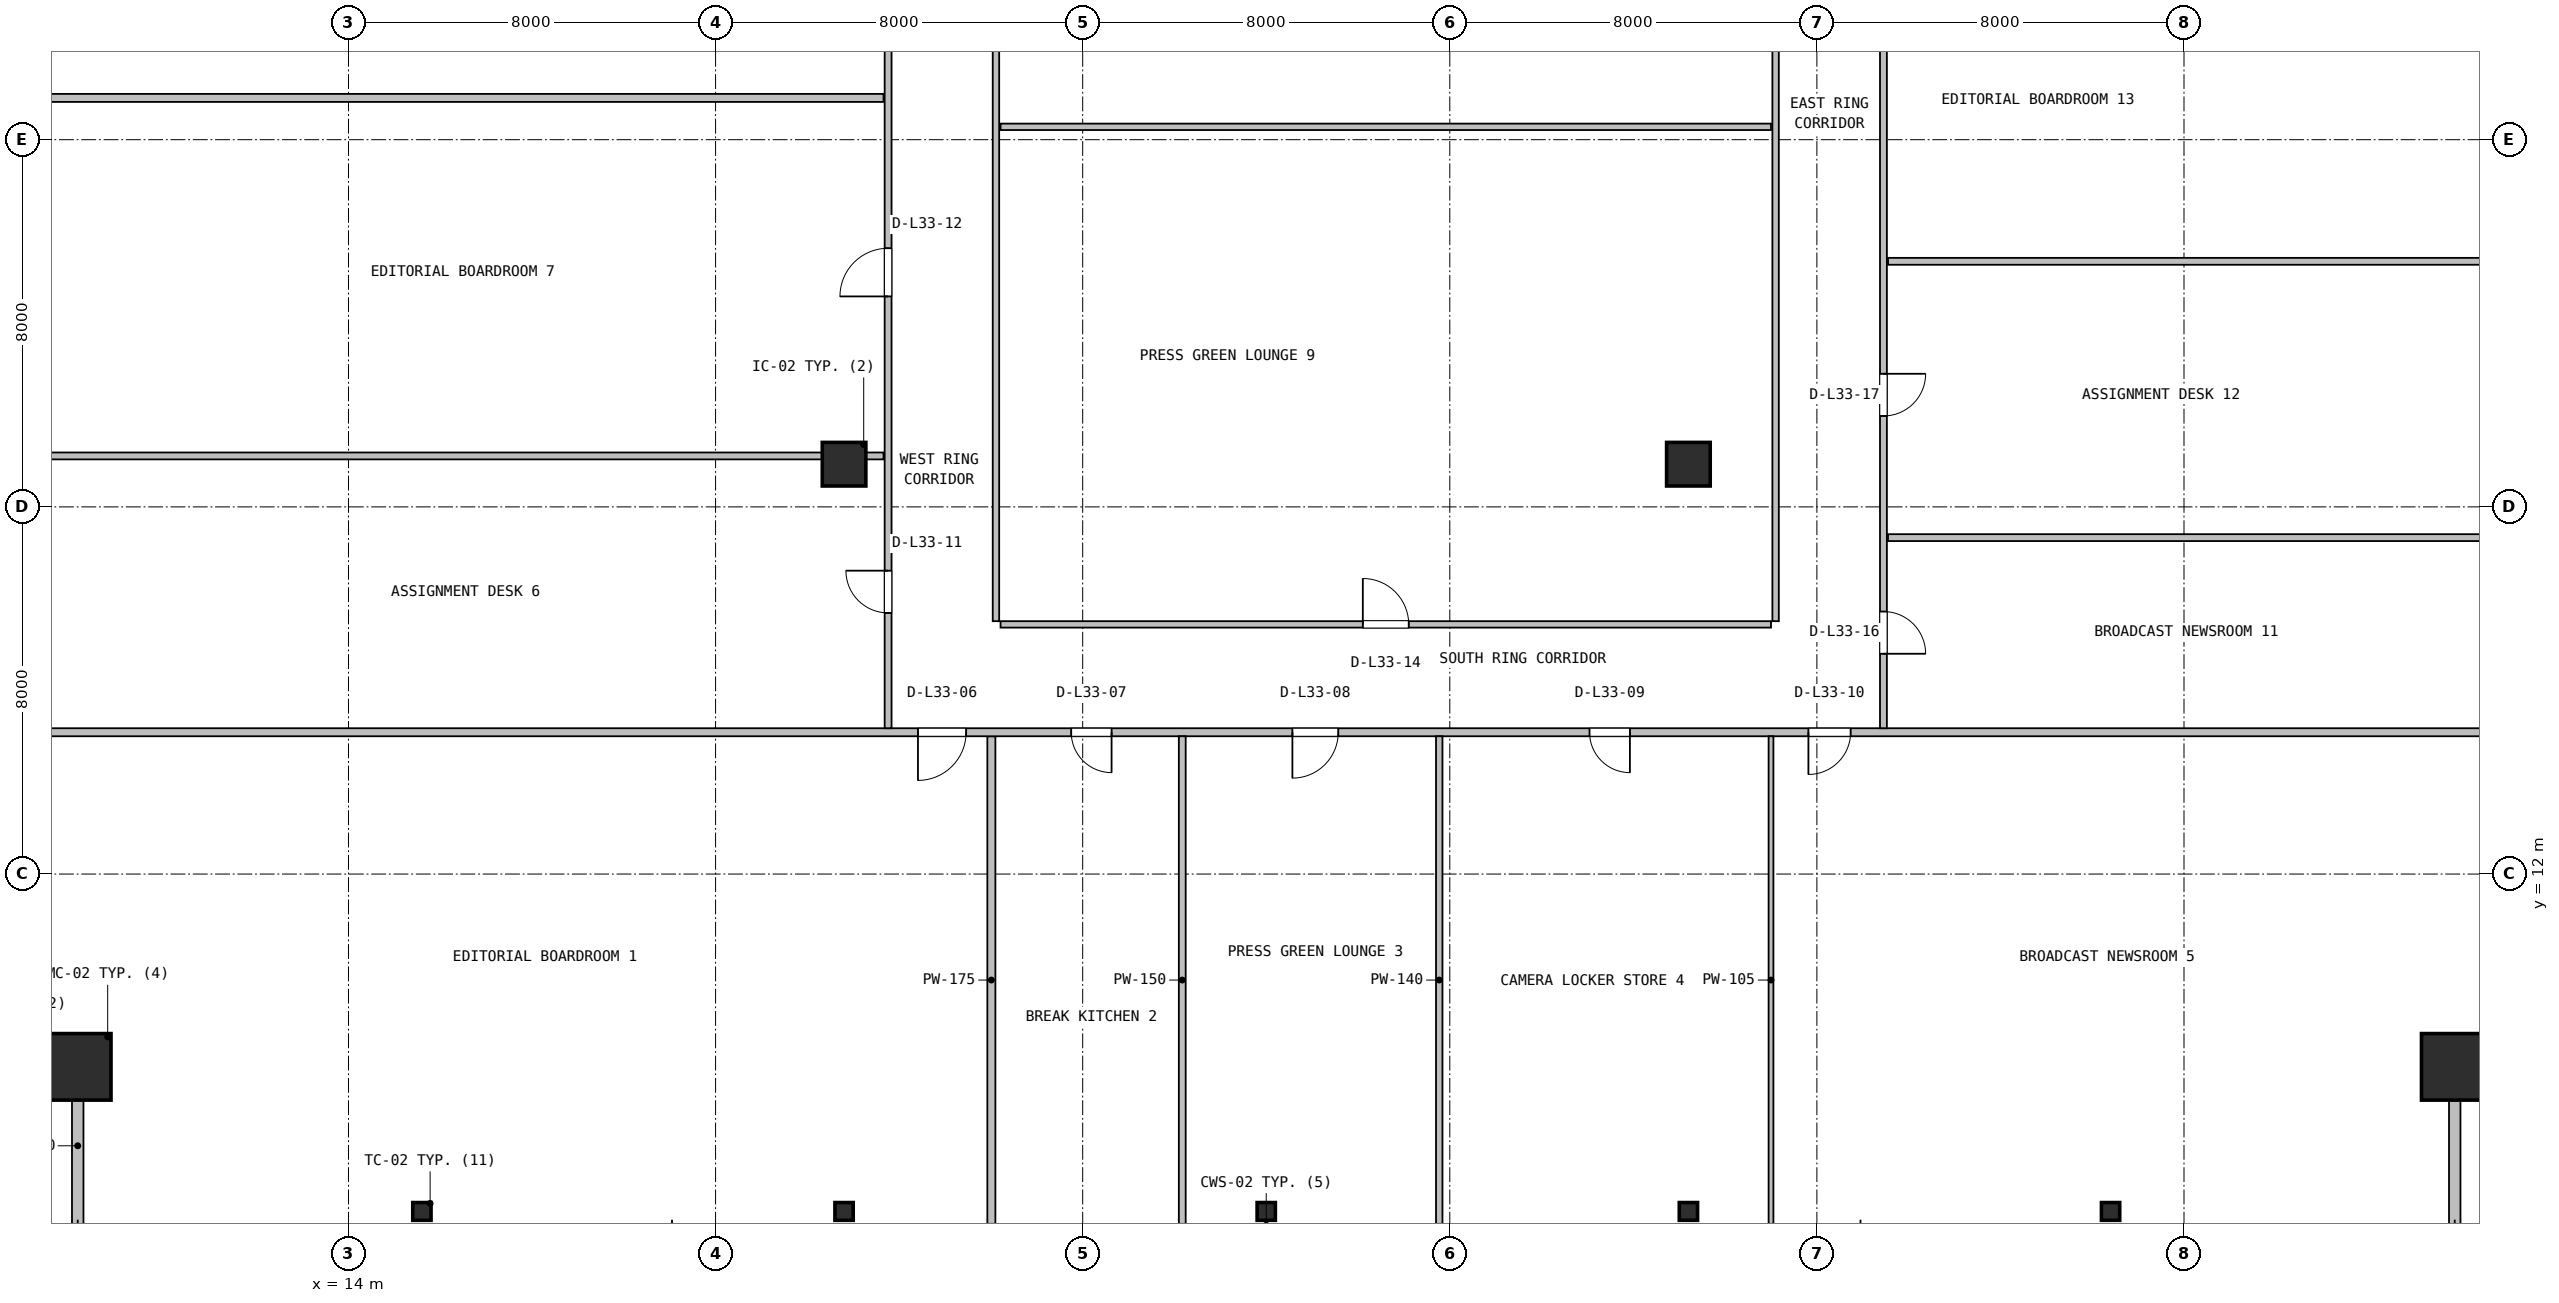
"""IFC4 building model, lengths in metres.
Left out: names, types, materials, properties, quantities, classifications, styles, units other than length and angle.
Written with IfcOpenShell. Run it as: python <this file> out.ifc"""

import sys

from ifc_helpers import new_model, si_unit, direction, frame, frame_2d, origin, origin_2d, place, context, subcontext, project, spatial, rectangle, hollow_rectangle, i_section, extrude, source, transform, mapped, element, fill, save


model = new_model("IFC4")
c1 = context("Model", 3, precision=1e-05, world=origin(), true_north=direction((0.0, 1.0)))
c2 = subcontext(c1, "Body", "Model", "MODEL_VIEW")
j1 = project(units=[si_unit("LENGTHUNIT", "METRE"), si_unit("PLANEANGLEUNIT", "RADIAN")], contexts=[c1])
p1 = place(None, origin())
s1 = spatial("IfcSite", under=j1, at=p1, CompositionType="ELEMENT")
p2 = place(p1, origin())
s2 = spatial("IfcBuilding", under=s1, at=p2, CompositionType="ELEMENT")
p3 = place(p2, frame((0.0, 0.0, 137.2)))
s3 = spatial("IfcBuildingStorey", under=s2, at=p3, CompositionType="ELEMENT", Elevation=137.2)
m1 = source(origin(), c2, "Body", "SweptSolid", [
    extrude(hollow_rectangle(XDim=1.45, YDim=1.45, WallThickness=0.055, at=origin_2d()), origin(), (0.0, 0.0, 1.0), 3.8),
])
for number, where, z_axis, x_axis in (
    (1, (8.1, 7.8, 0.0), (0.0, 0.0, 1.0), (1.0, 0.0, 0.0)),
    (2, (59.9, 7.8, 0.0), (0.0, 0.0, 1.0), (1.0, 0.0, 0.0)),
):
    element("IfcColumn", number, at=place(p3, frame(where, z_axis=z_axis, x_axis=x_axis)), inside=s3, PredefinedType="COLUMN", context=c2, shape_type="MappedRepresentation", body=[
        mapped(m1, transform((0.0, 0.0, 0.0), x_axis=(1.0, 0.0, 0.0), y_axis=(0.0, 1.0, 0.0), z_axis=(0.0, 0.0, 1.0), scale=1.0)),
    ])
m2 = source(origin(), c2, "Body", "SweptSolid", [
    extrude(i_section(OverallWidth=0.398, OverallDepth=0.387, WebThickness=0.021, FlangeThickness=0.033, FilletRadius=0.018, at=origin_2d()), origin(), (0.0, 0.0, 1.0), 3.8),
])
for number, where, z_axis, x_axis in (
    (3, (15.6, 4.65, 0.0), (0.0, 0.0, 1.0), (1.0, 0.0, 0.0)),
    (4, (24.8, 4.65, 0.0), (0.0, 0.0, 1.0), (1.0, 0.0, 0.0)),
    (5, (34.0, 4.65, 0.0), (0.0, 0.0, 1.0), (1.0, 0.0, 0.0)),
    (6, (43.2, 4.65, 0.0), (0.0, 0.0, 1.0), (1.0, 0.0, 0.0)),
    (7, (52.4, 4.65, 0.0), (0.0, 0.0, 1.0), (1.0, 0.0, 0.0)),
):
    element("IfcColumn", number, at=place(p3, frame(where, z_axis=z_axis, x_axis=x_axis)), inside=s3, PredefinedType="COLUMN", context=c2, shape_type="MappedRepresentation", body=[
        mapped(m2, transform((0.0, 0.0, 0.0), x_axis=(1.0, 0.0, 0.0), y_axis=(0.0, 1.0, 0.0), z_axis=(0.0, 0.0, 1.0), scale=1.0)),
    ])
m3 = source(origin(), c2, "Body", "SweptSolid", [
    extrude(rectangle(XDim=0.95, YDim=0.95, at=origin_2d()), origin(), (0.0, 0.0, 1.0), 3.8),
])
for number, where, z_axis, x_axis in (
    (8, (24.8, 20.93, 0.0), (0.0, 0.0, 1.0), (1.0, 0.0, 0.0)),
    (9, (43.2, 20.93, 0.0), (0.0, 0.0, 1.0), (1.0, 0.0, 0.0)),
):
    element("IfcColumn", number, at=place(p3, frame(where, z_axis=z_axis, x_axis=x_axis)), inside=s3, PredefinedType="COLUMN", context=c2, shape_type="MappedRepresentation", body=[
        mapped(m3, transform((0.0, 0.0, 0.0), x_axis=(1.0, 0.0, 0.0), y_axis=(0.0, 1.0, 0.0), z_axis=(0.0, 0.0, 1.0), scale=1.0)),
    ])
for number, where, z_axis, x_axis in (
    (10, (8.1, 4.28, 0.0), (0.0, 0.0, 1.0), (0.0, 1.0, 0.0)),
    (11, (59.9, 4.28, 0.0), (0.0, 0.0, 1.0), (0.0, 1.0, 0.0)),
):
    element("IfcWall", number, at=place(p3, frame(where, z_axis=z_axis, x_axis=x_axis)), inside=s3, PredefinedType="SOLIDWALL", context=c2, shape_type="SweptSolid", body=[
        extrude(rectangle(XDim=3.6, YDim=0.25, at=frame_2d((1.8, 0.0))), origin(), (0.0, 0.0, 1.0), 3.038),
    ])
p4 = place(p3, frame((28.01, 4.38, 0.0), z_axis=(0.0, 0.0, 1.0), x_axis=(0.0, 1.0, 0.0)))
e12 = element("IfcWall", 12, at=p4, inside=s3, PredefinedType="PARTITIONING", context=c2, shape_type="SweptSolid", body=[
    extrude(rectangle(XDim=10.622, YDim=0.175, at=frame_2d((5.311, 0.0))), origin(), (0.0, 0.0, 1.0), 3.038),
])
p5 = place(p3, frame((4.68, 15.09, 0.0), z_axis=(0.0, 0.0, 1.0), x_axis=(1.0, 0.0, 0.0)))
e13 = element("IfcWall", 13, at=p5, inside=s3, PredefinedType="PARTITIONING", context=c2, shape_type="SweptSolid", body=[
    extrude(rectangle(XDim=58.64, YDim=0.175, at=frame_2d((29.32, 0.0))), origin(), (0.0, 0.0, 1.0), 2.76),
])
p6 = place(p5, frame((21.73, 0.0, 0.0)))
e14 = element("IfcOpeningElement", 14, at=p6, cuts=e13, PredefinedType="OPENING", context=c2, shape_type="SweptSolid", body=[
    extrude(rectangle(XDim=1.05, YDim=2.1, at=frame_2d((0.525, 1.05))), frame((0.0, 0.098, 0.0), z_axis=(0.0, -1.0, 0.0), x_axis=(1.0, 0.0, 0.0)), (0.0, 0.0, 1.0), 0.195),
])
p7 = place(p5, frame((25.07, 0.0, 0.0)))
e15 = element("IfcOpeningElement", 15, at=p7, cuts=e13, PredefinedType="OPENING", context=c2, shape_type="SweptSolid", body=[
    extrude(rectangle(XDim=0.88, YDim=2.06, at=frame_2d((0.44, 1.03))), frame((0.0, 0.098, 0.0), z_axis=(0.0, -1.0, 0.0), x_axis=(1.0, 0.0, 0.0)), (0.0, 0.0, 1.0), 0.195),
])
p8 = place(p5, frame((29.89, 0.0, 0.0)))
e16 = element("IfcOpeningElement", 16, at=p8, cuts=e13, PredefinedType="OPENING", context=c2, shape_type="SweptSolid", body=[
    extrude(rectangle(XDim=1.0, YDim=2.1, at=frame_2d((0.5, 1.05))), frame((0.0, 0.098, 0.0), z_axis=(0.0, -1.0, 0.0), x_axis=(1.0, 0.0, 0.0)), (0.0, 0.0, 1.0), 0.195),
])
p9 = place(p5, frame((36.365, 0.0, 0.0)))
e17 = element("IfcOpeningElement", 17, at=p9, cuts=e13, PredefinedType="OPENING", context=c2, shape_type="SweptSolid", body=[
    extrude(rectangle(XDim=0.88, YDim=2.06, at=frame_2d((0.44, 1.03))), frame((0.0, 0.098, 0.0), z_axis=(0.0, -1.0, 0.0), x_axis=(1.0, 0.0, 0.0)), (0.0, 0.0, 1.0), 0.195),
])
p10 = place(p5, frame((41.135, 0.0, 0.0)))
e18 = element("IfcOpeningElement", 18, at=p10, cuts=e13, PredefinedType="OPENING", context=c2, shape_type="SweptSolid", body=[
    extrude(rectangle(XDim=0.92, YDim=2.08, at=frame_2d((0.46, 1.04))), frame((0.0, 0.098, 0.0), z_axis=(0.0, -1.0, 0.0), x_axis=(1.0, 0.0, 0.0)), (0.0, 0.0, 1.0), 0.195),
])
p11 = place(p3, frame((32.17, 4.38, 0.0), z_axis=(0.0, 0.0, 1.0), x_axis=(0.0, 1.0, 0.0)))
e19 = element("IfcWall", 19, at=p11, inside=s3, PredefinedType="PARTITIONING", context=c2, shape_type="SweptSolid", body=[
    extrude(rectangle(XDim=10.622, YDim=0.15, at=frame_2d((5.311, 0.0))), origin(), (0.0, 0.0, 1.0), 3.038),
])
p12 = place(p3, frame((37.77, 4.38, 0.0), z_axis=(0.0, 0.0, 1.0), x_axis=(0.0, 1.0, 0.0)))
e20 = element("IfcWall", 20, at=p12, inside=s3, PredefinedType="PARTITIONING", context=c2, shape_type="SweptSolid", body=[
    extrude(rectangle(XDim=10.622, YDim=0.14, at=frame_2d((5.311, 0.0))), origin(), (0.0, 0.0, 1.0), 3.038),
])
p13 = place(p3, frame((45.0, 4.38, 0.0), z_axis=(0.0, 0.0, 1.0), x_axis=(0.0, 1.0, 0.0)))
e21 = element("IfcWall", 21, at=p13, inside=s3, PredefinedType="PARTITIONING", context=c2, shape_type="SweptSolid", body=[
    extrude(rectangle(XDim=10.622, YDim=0.105, at=frame_2d((5.311, 0.0))), origin(), (0.0, 0.0, 1.0), 3.038),
])
p14 = place(p3, frame((25.76, 15.178, 0.0), z_axis=(0.0, 0.0, 1.0), x_axis=(0.0, 1.0, 0.0)))
e22 = element("IfcWall", 22, at=p14, inside=s3, PredefinedType="PARTITIONING", context=c2, shape_type="SweptSolid", body=[
    extrude(rectangle(XDim=18.097, YDim=0.15, at=frame_2d((9.048, 0.0))), origin(), (0.0, 0.0, 1.0), 2.76),
])
p15 = place(p14, frame((2.512, 0.0, 0.0)))
e23 = element("IfcOpeningElement", 23, at=p15, cuts=e22, PredefinedType="OPENING", context=c2, shape_type="SweptSolid", body=[
    extrude(rectangle(XDim=0.92, YDim=2.08, at=frame_2d((0.46, 1.04))), frame((0.0, 0.085, 0.0), z_axis=(0.0, -1.0, 0.0), x_axis=(1.0, 0.0, 0.0)), (0.0, 0.0, 1.0), 0.17),
])
p16 = place(p14, frame((9.407, 0.0, 0.0)))
e24 = element("IfcOpeningElement", 24, at=p16, cuts=e22, PredefinedType="OPENING", context=c2, shape_type="SweptSolid", body=[
    extrude(rectangle(XDim=1.05, YDim=2.1, at=frame_2d((0.525, 1.05))), frame((0.0, 0.085, 0.0), z_axis=(0.0, -1.0, 0.0), x_axis=(1.0, 0.0, 0.0)), (0.0, 0.0, 1.0), 0.17),
])
p17 = place(p3, frame((4.68, 21.11, 0.0), z_axis=(0.0, 0.0, 1.0), x_axis=(1.0, 0.0, 0.0)))
e25 = element("IfcWall", 25, at=p17, inside=s3, PredefinedType="PARTITIONING", context=c2, shape_type="SweptSolid", body=[
    extrude(rectangle(XDim=20.98, YDim=0.15, at=frame_2d((10.49, 0.0))), origin(), (0.0, 0.0, 1.0), 2.76),
])
p18 = place(p3, frame((4.68, 28.91, 0.0), z_axis=(0.0, 0.0, 1.0), x_axis=(1.0, 0.0, 0.0)))
e26 = element("IfcWall", 26, at=p18, inside=s3, PredefinedType="PARTITIONING", context=c2, shape_type="SweptSolid", body=[
    extrude(rectangle(XDim=20.98, YDim=0.175, at=frame_2d((10.49, 0.0))), origin(), (0.0, 0.0, 1.0), 2.76),
])
p19 = place(p3, frame((28.21, 17.44, 0.0), z_axis=(0.0, 0.0, 1.0), x_axis=(1.0, 0.0, 0.0)))
e27 = element("IfcWall", 27, at=p19, inside=s3, PredefinedType="PARTITIONING", context=c2, shape_type="SweptSolid", body=[
    extrude(rectangle(XDim=16.79, YDim=0.14, at=frame_2d((8.395, 0.0))), origin(), (0.0, 0.0, 1.0), 2.76),
])
p20 = place(p19, frame((7.895, 0.0, 0.0)))
e28 = element("IfcOpeningElement", 28, at=p20, cuts=e27, PredefinedType="OPENING", context=c2, shape_type="SweptSolid", body=[
    extrude(rectangle(XDim=1.0, YDim=2.1, at=frame_2d((0.5, 1.05))), frame((0.0, 0.08, 0.0), z_axis=(0.0, -1.0, 0.0), x_axis=(1.0, 0.0, 0.0)), (0.0, 0.0, 1.0), 0.16),
])
p21 = place(p3, frame((45.1, 17.51, 0.0), z_axis=(0.0, 0.0, 1.0), x_axis=(0.0, 1.0, 0.0)))
e29 = element("IfcWall", 29, at=p21, inside=s3, PredefinedType="PARTITIONING", context=c2, shape_type="SweptSolid", body=[
    extrude(rectangle(XDim=15.787, YDim=0.14, at=frame_2d((7.894, 0.0))), origin(), (0.0, 0.0, 1.0), 3.152),
])
p22 = place(p3, frame((28.21, 28.28, 0.0), z_axis=(0.0, 0.0, 1.0), x_axis=(1.0, 0.0, 0.0)))
e30 = element("IfcWall", 30, at=p22, inside=s3, PredefinedType="PARTITIONING", context=c2, shape_type="SweptSolid", body=[
    extrude(rectangle(XDim=16.79, YDim=0.14, at=frame_2d((8.395, 0.0))), origin(), (0.0, 0.0, 1.0), 2.76),
])
p23 = place(p3, frame((28.11, 17.51, 0.0), z_axis=(0.0, 0.0, 1.0), x_axis=(0.0, 1.0, 0.0)))
e31 = element("IfcWall", 31, at=p23, inside=s3, PredefinedType="PARTITIONING", context=c2, shape_type="SweptSolid", body=[
    extrude(rectangle(XDim=15.787, YDim=0.14, at=frame_2d((7.894, 0.0))), origin(), (0.0, 0.0, 1.0), 2.76),
])
p24 = place(p3, frame((47.55, 19.33, 0.0), z_axis=(0.0, 0.0, 1.0), x_axis=(1.0, 0.0, 0.0)))
e32 = element("IfcWall", 32, at=p24, inside=s3, PredefinedType="PARTITIONING", context=c2, shape_type="SweptSolid", body=[
    extrude(rectangle(XDim=15.77, YDim=0.15, at=frame_2d((7.885, 0.0))), origin(), (0.0, 0.0, 1.0), 3.038),
])
p25 = place(p3, frame((47.45, 15.178, 0.0), z_axis=(0.0, 0.0, 1.0), x_axis=(0.0, 1.0, 0.0)))
e33 = element("IfcWall", 33, at=p25, inside=s3, PredefinedType="PARTITIONING", context=c2, shape_type="SweptSolid", body=[
    extrude(rectangle(XDim=18.085, YDim=0.15, at=frame_2d((9.042, 0.0))), origin(), (0.0, 0.0, 1.0), 3.152),
])
p26 = place(p25, frame((1.622, 0.0, 0.0)))
e34 = element("IfcOpeningElement", 34, at=p26, cuts=e33, PredefinedType="OPENING", context=c2, shape_type="SweptSolid", body=[
    extrude(rectangle(XDim=0.92, YDim=2.08, at=frame_2d((0.46, 1.04))), frame((0.0, 0.085, 0.0), z_axis=(0.0, -1.0, 0.0), x_axis=(1.0, 0.0, 0.0)), (0.0, 0.0, 1.0), 0.17),
])
p27 = place(p25, frame((6.802, 0.0, 0.0)))
e35 = element("IfcOpeningElement", 35, at=p27, cuts=e33, PredefinedType="OPENING", context=c2, shape_type="SweptSolid", body=[
    extrude(rectangle(XDim=0.92, YDim=2.08, at=frame_2d((0.46, 1.04))), frame((0.0, 0.085, 0.0), z_axis=(0.0, -1.0, 0.0), x_axis=(1.0, 0.0, 0.0)), (0.0, 0.0, 1.0), 0.17),
])
p28 = place(p3, frame((47.55, 25.35, 0.0), z_axis=(0.0, 0.0, 1.0), x_axis=(1.0, 0.0, 0.0)))
e36 = element("IfcWall", 36, at=p28, inside=s3, PredefinedType="PARTITIONING", context=c2, shape_type="SweptSolid", body=[
    extrude(rectangle(XDim=15.77, YDim=0.15, at=frame_2d((7.885, 0.0))), origin(), (0.0, 0.0, 1.0), 3.038),
])
m4 = source(origin(), c2, "Body", "SweptSolid", [
    extrude(rectangle(XDim=1.05, YDim=2.1, at=frame_2d((0.525, 1.05))), frame((0.0, 0.025, 0.0), z_axis=(0.0, -1.0, 0.0), x_axis=(1.0, 0.0, 0.0)), (0.0, 0.0, 1.0), 0.05),
])
p29 = place(p6, frame((1.05, 0.0, 0.0), z_axis=(0.0, 0.0, 1.0), x_axis=(-1.0, 0.0, 0.0)))
e37 = element("IfcDoor", 37, at=p29, inside=s3, OperationType="SINGLE_SWING_LEFT", PredefinedType="DOOR", context=c2, shape_type="MappedRepresentation", body=[
    mapped(m4, transform((0.0, 0.0, 0.0), x_axis=(1.0, 0.0, 0.0), y_axis=(0.0, 1.0, 0.0), z_axis=(0.0, 0.0, 1.0), scale=1.0)),
])
fill(e14, e37)
m5 = source(origin(), c2, "Body", "SweptSolid", [
    extrude(rectangle(XDim=0.88, YDim=2.06, at=frame_2d((0.44, 1.03))), frame((0.0, 0.025, 0.0), z_axis=(0.0, -1.0, 0.0), x_axis=(1.0, 0.0, 0.0)), (0.0, 0.0, 1.0), 0.05),
])
p30 = place(p7, frame((0.88, 0.0, 0.0), z_axis=(0.0, 0.0, 1.0), x_axis=(-1.0, 0.0, 0.0)))
e38 = element("IfcDoor", 38, at=p30, inside=s3, OperationType="SINGLE_SWING_RIGHT", PredefinedType="DOOR", context=c2, shape_type="MappedRepresentation", body=[
    mapped(m5, transform((0.0, 0.0, 0.0), x_axis=(1.0, 0.0, 0.0), y_axis=(0.0, 1.0, 0.0), z_axis=(0.0, 0.0, 1.0), scale=1.0)),
])
fill(e15, e38)
m6 = source(origin(), c2, "Body", "SweptSolid", [
    extrude(rectangle(XDim=1.0, YDim=2.1, at=frame_2d((0.5, 1.05))), frame((0.0, 0.025, 0.0), z_axis=(0.0, -1.0, 0.0), x_axis=(1.0, 0.0, 0.0)), (0.0, 0.0, 1.0), 0.05),
])
p31 = place(p8, frame((1.0, 0.0, 0.0), z_axis=(0.0, 0.0, 1.0), x_axis=(-1.0, 0.0, 0.0)))
e39 = element("IfcDoor", 39, at=p31, inside=s3, OperationType="SINGLE_SWING_LEFT", PredefinedType="DOOR", context=c2, shape_type="MappedRepresentation", body=[
    mapped(m6, transform((0.0, 0.0, 0.0), x_axis=(1.0, 0.0, 0.0), y_axis=(0.0, 1.0, 0.0), z_axis=(0.0, 0.0, 1.0), scale=1.0)),
])
fill(e16, e39)
p32 = place(p9, frame((0.88, 0.0, 0.0), z_axis=(0.0, 0.0, 1.0), x_axis=(-1.0, 0.0, 0.0)))
e40 = element("IfcDoor", 40, at=p32, inside=s3, OperationType="SINGLE_SWING_RIGHT", PredefinedType="DOOR", context=c2, shape_type="MappedRepresentation", body=[
    mapped(m5, transform((0.0, 0.0, 0.0), x_axis=(1.0, 0.0, 0.0), y_axis=(0.0, 1.0, 0.0), z_axis=(0.0, 0.0, 1.0), scale=1.0)),
])
fill(e17, e40)
m7 = source(origin(), c2, "Body", "SweptSolid", [
    extrude(rectangle(XDim=0.92, YDim=2.08, at=frame_2d((0.46, 1.04))), frame((0.0, 0.025, 0.0), z_axis=(0.0, -1.0, 0.0), x_axis=(1.0, 0.0, 0.0)), (0.0, 0.0, 1.0), 0.05),
])
p33 = place(p10, frame((0.92, 0.0, 0.0), z_axis=(0.0, 0.0, 1.0), x_axis=(-1.0, 0.0, 0.0)))
e41 = element("IfcDoor", 41, at=p33, inside=s3, OperationType="SINGLE_SWING_LEFT", PredefinedType="DOOR", context=c2, shape_type="MappedRepresentation", body=[
    mapped(m7, transform((0.0, 0.0, 0.0), x_axis=(1.0, 0.0, 0.0), y_axis=(0.0, 1.0, 0.0), z_axis=(0.0, 0.0, 1.0), scale=1.0)),
])
fill(e18, e41)
p34 = place(p15, origin())
e42 = element("IfcDoor", 42, at=p34, inside=s3, OperationType="SINGLE_SWING_RIGHT", PredefinedType="DOOR", context=c2, shape_type="MappedRepresentation", body=[
    mapped(m7, transform((0.0, 0.0, 0.0), x_axis=(1.0, 0.0, 0.0), y_axis=(0.0, 1.0, 0.0), z_axis=(0.0, 0.0, 1.0), scale=1.0)),
])
fill(e23, e42)
p35 = place(p16, origin())
e43 = element("IfcDoor", 43, at=p35, inside=s3, OperationType="SINGLE_SWING_LEFT", PredefinedType="DOOR", context=c2, shape_type="MappedRepresentation", body=[
    mapped(m4, transform((0.0, 0.0, 0.0), x_axis=(1.0, 0.0, 0.0), y_axis=(0.0, 1.0, 0.0), z_axis=(0.0, 0.0, 1.0), scale=1.0)),
])
fill(e24, e43)
p36 = place(p20, origin())
e44 = element("IfcDoor", 44, at=p36, inside=s3, OperationType="SINGLE_SWING_LEFT", PredefinedType="DOOR", context=c2, shape_type="MappedRepresentation", body=[
    mapped(m6, transform((0.0, 0.0, 0.0), x_axis=(1.0, 0.0, 0.0), y_axis=(0.0, 1.0, 0.0), z_axis=(0.0, 0.0, 1.0), scale=1.0)),
])
fill(e28, e44)
p37 = place(p26, frame((0.92, 0.0, 0.0), z_axis=(0.0, 0.0, 1.0), x_axis=(-1.0, 0.0, 0.0)))
e45 = element("IfcDoor", 45, at=p37, inside=s3, OperationType="SINGLE_SWING_LEFT", PredefinedType="DOOR", context=c2, shape_type="MappedRepresentation", body=[
    mapped(m7, transform((0.0, 0.0, 0.0), x_axis=(1.0, 0.0, 0.0), y_axis=(0.0, 1.0, 0.0), z_axis=(0.0, 0.0, 1.0), scale=1.0)),
])
fill(e34, e45)
p38 = place(p27, frame((0.92, 0.0, 0.0), z_axis=(0.0, 0.0, 1.0), x_axis=(-1.0, 0.0, 0.0)))
e46 = element("IfcDoor", 46, at=p38, inside=s3, OperationType="SINGLE_SWING_RIGHT", PredefinedType="DOOR", context=c2, shape_type="MappedRepresentation", body=[
    mapped(m7, transform((0.0, 0.0, 0.0), x_axis=(1.0, 0.0, 0.0), y_axis=(0.0, 1.0, 0.0), z_axis=(0.0, 0.0, 1.0), scale=1.0)),
])
fill(e35, e46)
save(model, sys.argv[1])
